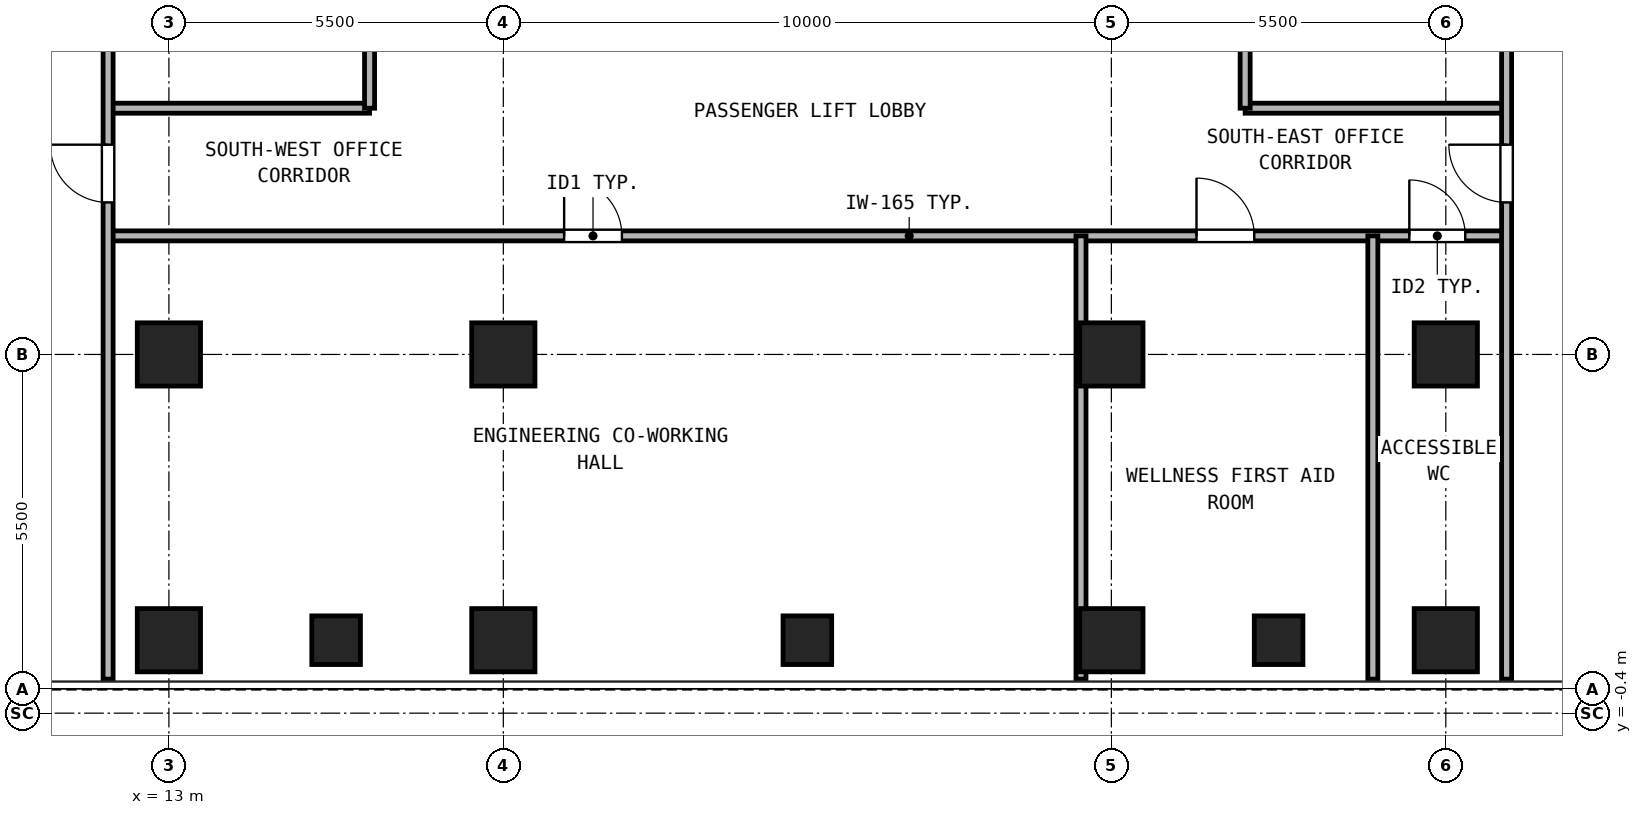
"""IFC4 building model, lengths in metres.
Left out: names, types, materials, properties, quantities, classifications, styles, units other than length and angle.
Written with IfcOpenShell. Run it as: python <this file> out.ifc"""

import sys

from ifc_helpers import new_model, si_unit, direction, frame, frame_2d, origin, origin_2d, place, context, subcontext, project, spatial, rectangle, hollow_rectangle, extrude, source, transform, mapped, element, fill, save


model = new_model("IFC4")
c1 = context("Model", 3, precision=1e-05, world=origin(), true_north=direction((0.0, 1.0)))
c2 = subcontext(c1, "Body", "Model", "MODEL_VIEW")
j1 = project(units=[si_unit("LENGTHUNIT", "METRE"), si_unit("PLANEANGLEUNIT", "RADIAN")], contexts=[c1])
p1 = place(None, origin())
s1 = spatial("IfcSite", under=j1, at=p1, CompositionType="ELEMENT")
p2 = place(p1, origin())
s2 = spatial("IfcBuilding", under=s1, at=p2, CompositionType="ELEMENT")
p3 = place(p2, frame((0.0, 0.0, 62.1)))
s3 = spatial("IfcBuildingStorey", under=s2, at=p3, CompositionType="ELEMENT", Elevation=62.1)
m1 = source(origin(), c2, "Body", "SweptSolid", [
    extrude(hollow_rectangle(XDim=1.04, YDim=1.04, WallThickness=0.065, at=origin_2d()), origin(), (0.0, 0.0, 1.0), 3.32),
])
for number, where, z_axis, x_axis in (
    (1, (13.0, 0.8, 0.0), (0.0, 0.0, 1.0), (1.0, 0.0, 0.0)),
    (2, (18.5, 0.8, 0.0), (0.0, 0.0, 1.0), (1.0, 0.0, 0.0)),
    (3, (28.5, 0.8, 0.0), (0.0, 0.0, 1.0), (1.0, 0.0, 0.0)),
    (4, (34.0, 0.8, 0.0), (0.0, 0.0, 1.0), (1.0, 0.0, 0.0)),
    (5, (13.0, 5.5, 0.0), (0.0, 0.0, 1.0), (1.0, 0.0, 0.0)),
    (6, (18.5, 5.5, 0.0), (0.0, 0.0, 1.0), (1.0, 0.0, 0.0)),
    (7, (28.5, 5.5, 0.0), (0.0, 0.0, 1.0), (1.0, 0.0, 0.0)),
    (8, (34.0, 5.5, 0.0), (0.0, 0.0, 1.0), (1.0, 0.0, 0.0)),
):
    element("IfcColumn", number, at=place(p3, frame(where, z_axis=z_axis, x_axis=x_axis)), inside=s3, PredefinedType="COLUMN", context=c2, shape_type="MappedRepresentation", body=[
        mapped(m1, transform((0.0, 0.0, 0.0), x_axis=(1.0, 0.0, 0.0), y_axis=(0.0, 1.0, 0.0), z_axis=(0.0, 0.0, 1.0), scale=1.0)),
    ])
m2 = source(origin(), c2, "Body", "SweptSolid", [
    extrude(hollow_rectangle(XDim=0.8, YDim=0.8, WallThickness=0.045, at=origin_2d()), origin(), (0.0, 0.0, 1.0), 3.32),
])
for number, where, z_axis, x_axis in (
    (9, (15.75, 0.8, 0.0), (0.0, 0.0, 1.0), (1.0, 0.0, 0.0)),
    (10, (23.5, 0.8, 0.0), (0.0, 0.0, 1.0), (1.0, 0.0, 0.0)),
    (11, (31.25, 0.8, 0.0), (0.0, 0.0, 1.0), (1.0, 0.0, 0.0)),
):
    element("IfcColumn", number, at=place(p3, frame(where, z_axis=z_axis, x_axis=x_axis)), inside=s3, PredefinedType="COLUMN", context=c2, shape_type="MappedRepresentation", body=[
        mapped(m2, transform((0.0, 0.0, 0.0), x_axis=(1.0, 0.0, 0.0), y_axis=(0.0, 1.0, 0.0), z_axis=(0.0, 0.0, 1.0), scale=1.0)),
    ])
p4 = place(p3, frame((12.0, 7.45, 0.0), z_axis=(0.0, 0.0, 1.0), x_axis=(1.0, 0.0, 0.0)))
e12 = element("IfcWall", 12, at=p4, inside=s3, PredefinedType="PARTITIONING", context=c2, shape_type="SweptSolid", body=[
    extrude(rectangle(XDim=23.0, YDim=0.165, at=frame_2d((11.5, 0.0))), origin(), (0.0, 0.0, 1.0), 3.32),
])
p5 = place(p4, frame((7.5, 0.0, 0.0)))
e13 = element("IfcOpeningElement", 13, at=p5, cuts=e12, PredefinedType="OPENING", context=c2, shape_type="SweptSolid", body=[
    extrude(rectangle(XDim=0.95, YDim=2.15, at=frame_2d((0.475, 1.075))), frame((0.0, 0.093, 0.0), z_axis=(0.0, -1.0, 0.0), x_axis=(1.0, 0.0, 0.0)), (0.0, 0.0, 1.0), 0.185),
])
p6 = place(p4, frame((17.9, 0.0, 0.0)))
e14 = element("IfcOpeningElement", 14, at=p6, cuts=e12, PredefinedType="OPENING", context=c2, shape_type="SweptSolid", body=[
    extrude(rectangle(XDim=0.95, YDim=2.15, at=frame_2d((0.475, 1.075))), frame((0.0, 0.093, 0.0), z_axis=(0.0, -1.0, 0.0), x_axis=(1.0, 0.0, 0.0)), (0.0, 0.0, 1.0), 0.185),
])
p7 = place(p4, frame((21.4, 0.0, 0.0)))
e15 = element("IfcOpeningElement", 15, at=p7, cuts=e12, PredefinedType="OPENING", context=c2, shape_type="SweptSolid", body=[
    extrude(rectangle(XDim=0.92, YDim=2.1, at=frame_2d((0.46, 1.05))), frame((0.0, 0.093, 0.0), z_axis=(0.0, -1.0, 0.0), x_axis=(1.0, 0.0, 0.0)), (0.0, 0.0, 1.0), 0.185),
])
for number, where, z_axis, x_axis in (
    (16, (12.0, 9.55, 0.0), (0.0, 0.0, 1.0), (1.0, 0.0, 0.0)),
    (17, (30.7, 9.55, 0.0), (0.0, 0.0, 1.0), (1.0, 0.0, 0.0)),
):
    element("IfcWall", number, at=place(p3, frame(where, z_axis=z_axis, x_axis=x_axis)), inside=s3, PredefinedType="PARTITIONING", context=c2, shape_type="SweptSolid", body=[
        extrude(rectangle(XDim=4.3, YDim=0.165, at=frame_2d((2.15, 0.0))), origin(), (0.0, 0.0, 1.0), 3.32),
    ])
p8 = place(p3, frame((16.3, 9.55, 0.0), z_axis=(0.0, 0.0, 1.0), x_axis=(0.0, 1.0, 0.0)))
e18 = element("IfcWall", 18, at=p8, inside=s3, PredefinedType="PARTITIONING", context=c2, shape_type="SweptSolid", body=[
    extrude(rectangle(XDim=20.9, YDim=0.165, at=frame_2d((10.45, 0.0))), origin(), (0.0, 0.0, 1.0), 3.32),
])
p9 = place(p8, frame((6.231, 0.0, 0.0)))
e19 = element("IfcOpeningElement", 19, at=p9, cuts=e18, PredefinedType="OPENING", context=c2, shape_type="SweptSolid", body=[
    extrude(rectangle(XDim=0.95, YDim=2.15, at=frame_2d((0.475, 1.075))), frame((0.0, 0.093, 0.0), z_axis=(0.0, -1.0, 0.0), x_axis=(1.0, 0.0, 0.0)), (0.0, 0.0, 1.0), 0.185),
])
p10 = place(p8, frame((16.681, 0.0, 0.0)))
e20 = element("IfcOpeningElement", 20, at=p10, cuts=e18, PredefinedType="OPENING", context=c2, shape_type="SweptSolid", body=[
    extrude(rectangle(XDim=0.95, YDim=2.15, at=frame_2d((0.475, 1.075))), frame((0.0, 0.093, 0.0), z_axis=(0.0, -1.0, 0.0), x_axis=(1.0, 0.0, 0.0)), (0.0, 0.0, 1.0), 0.185),
])
p11 = place(p3, frame((30.7, 9.55, 0.0), z_axis=(0.0, 0.0, 1.0), x_axis=(0.0, 1.0, 0.0)))
e21 = element("IfcWall", 21, at=p11, inside=s3, PredefinedType="PARTITIONING", context=c2, shape_type="SweptSolid", body=[
    extrude(rectangle(XDim=20.9, YDim=0.165, at=frame_2d((10.45, 0.0))), origin(), (0.0, 0.0, 1.0), 3.32),
])
p12 = place(p11, frame((9.95, 0.0, 0.0)))
e22 = element("IfcOpeningElement", 22, at=p12, cuts=e21, PredefinedType="OPENING", context=c2, shape_type="SweptSolid", body=[
    extrude(rectangle(XDim=0.95, YDim=2.15, at=frame_2d((0.475, 1.075))), frame((0.0, 0.093, 0.0), z_axis=(0.0, -1.0, 0.0), x_axis=(1.0, 0.0, 0.0)), (0.0, 0.0, 1.0), 0.185),
])
p13 = place(p3, frame((12.0, 0.16, 0.0), z_axis=(0.0, 0.0, 1.0), x_axis=(0.0, 1.0, 0.0)))
e23 = element("IfcWall", 23, at=p13, inside=s3, PredefinedType="PARTITIONING", context=c2, shape_type="SweptSolid", body=[
    extrude(rectangle(XDim=40.18, YDim=0.165, at=frame_2d((20.09, 0.0))), origin(), (0.0, 0.0, 1.0), 3.32),
])
p14 = place(p13, frame((7.84, 0.0, 0.0)))
e24 = element("IfcOpeningElement", 24, at=p14, cuts=e23, PredefinedType="OPENING", context=c2, shape_type="SweptSolid", body=[
    extrude(rectangle(XDim=0.95, YDim=2.15, at=frame_2d((0.475, 1.075))), frame((0.0, 0.093, 0.0), z_axis=(0.0, -1.0, 0.0), x_axis=(1.0, 0.0, 0.0)), (0.0, 0.0, 1.0), 0.185),
])
p15 = place(p13, frame((30.84, 0.0, 0.0)))
e25 = element("IfcOpeningElement", 25, at=p15, cuts=e23, PredefinedType="OPENING", context=c2, shape_type="SweptSolid", body=[
    extrude(rectangle(XDim=0.95, YDim=2.15, at=frame_2d((0.475, 1.075))), frame((0.0, 0.093, 0.0), z_axis=(0.0, -1.0, 0.0), x_axis=(1.0, 0.0, 0.0)), (0.0, 0.0, 1.0), 0.185),
])
p16 = place(p3, frame((35.0, 0.16, 0.0), z_axis=(0.0, 0.0, 1.0), x_axis=(0.0, 1.0, 0.0)))
e26 = element("IfcWall", 26, at=p16, inside=s3, PredefinedType="PARTITIONING", context=c2, shape_type="SweptSolid", body=[
    extrude(rectangle(XDim=40.18, YDim=0.165, at=frame_2d((20.09, 0.0))), origin(), (0.0, 0.0, 1.0), 3.32),
])
p17 = place(p16, frame((7.84, 0.0, 0.0)))
e27 = element("IfcOpeningElement", 27, at=p17, cuts=e26, PredefinedType="OPENING", context=c2, shape_type="SweptSolid", body=[
    extrude(rectangle(XDim=0.95, YDim=2.15, at=frame_2d((0.475, 1.075))), frame((0.0, 0.093, 0.0), z_axis=(0.0, -1.0, 0.0), x_axis=(1.0, 0.0, 0.0)), (0.0, 0.0, 1.0), 0.185),
])
p18 = place(p16, frame((30.84, 0.0, 0.0)))
e28 = element("IfcOpeningElement", 28, at=p18, cuts=e26, PredefinedType="OPENING", context=c2, shape_type="SweptSolid", body=[
    extrude(rectangle(XDim=0.95, YDim=2.15, at=frame_2d((0.475, 1.075))), frame((0.0, 0.093, 0.0), z_axis=(0.0, -1.0, 0.0), x_axis=(1.0, 0.0, 0.0)), (0.0, 0.0, 1.0), 0.185),
])
for number, where, z_axis, x_axis in (
    (29, (28.0, 0.16, 0.0), (0.0, 0.0, 1.0), (0.0, 1.0, 0.0)),
    (30, (32.8, 0.16, 0.0), (0.0, 0.0, 1.0), (0.0, 1.0, 0.0)),
):
    element("IfcWall", number, at=place(p3, frame(where, z_axis=z_axis, x_axis=x_axis)), inside=s3, PredefinedType="PARTITIONING", context=c2, shape_type="SweptSolid", body=[
        extrude(rectangle(XDim=7.29, YDim=0.165, at=frame_2d((3.645, 0.0))), origin(), (0.0, 0.0, 1.0), 3.32),
    ])
p19 = place(p5, frame((0.95, 0.0, 0.0), z_axis=(0.0, 0.0, 1.0), x_axis=(-1.0, 0.0, 0.0)))
e31 = element("IfcDoor", 31, at=p19, inside=s3, OperationType="SINGLE_SWING_LEFT", PredefinedType="DOOR", context=c2, shape_type="SweptSolid", body=[
    extrude(rectangle(XDim=0.95, YDim=2.15, at=frame_2d((0.475, 1.075))), frame((0.0, 0.025, 0.0), z_axis=(0.0, -1.0, 0.0), x_axis=(1.0, 0.0, 0.0)), (0.0, 0.0, 1.0), 0.05),
])
fill(e13, e31)
p20 = place(p6, frame((0.95, 0.0, 0.0), z_axis=(0.0, 0.0, 1.0), x_axis=(-1.0, 0.0, 0.0)))
e32 = element("IfcDoor", 32, at=p20, inside=s3, OperationType="SINGLE_SWING_LEFT", PredefinedType="DOOR", context=c2, shape_type="SweptSolid", body=[
    extrude(rectangle(XDim=0.95, YDim=2.15, at=frame_2d((0.475, 1.075))), frame((0.0, 0.025, 0.0), z_axis=(0.0, -1.0, 0.0), x_axis=(1.0, 0.0, 0.0)), (0.0, 0.0, 1.0), 0.05),
])
fill(e14, e32)
p21 = place(p7, frame((0.92, 0.0, 0.0), z_axis=(0.0, 0.0, 1.0), x_axis=(-1.0, 0.0, 0.0)))
e33 = element("IfcDoor", 33, at=p21, inside=s3, OperationType="SINGLE_SWING_LEFT", PredefinedType="DOOR", context=c2, shape_type="SweptSolid", body=[
    extrude(rectangle(XDim=0.92, YDim=2.1, at=frame_2d((0.46, 1.05))), frame((0.0, 0.025, 0.0), z_axis=(0.0, -1.0, 0.0), x_axis=(1.0, 0.0, 0.0)), (0.0, 0.0, 1.0), 0.05),
])
fill(e15, e33)
p22 = place(p14, frame((0.95, 0.0, 0.0), z_axis=(0.0, 0.0, 1.0), x_axis=(-1.0, 0.0, 0.0)))
e34 = element("IfcDoor", 34, at=p22, inside=s3, OperationType="SINGLE_SWING_RIGHT", PredefinedType="DOOR", context=c2, shape_type="SweptSolid", body=[
    extrude(rectangle(XDim=0.95, YDim=2.15, at=frame_2d((0.475, 1.075))), frame((0.0, 0.025, 0.0), z_axis=(0.0, -1.0, 0.0), x_axis=(1.0, 0.0, 0.0)), (0.0, 0.0, 1.0), 0.05),
])
fill(e24, e34)
p23 = place(p17, origin())
e35 = element("IfcDoor", 35, at=p23, inside=s3, OperationType="SINGLE_SWING_RIGHT", PredefinedType="DOOR", context=c2, shape_type="SweptSolid", body=[
    extrude(rectangle(XDim=0.95, YDim=2.15, at=frame_2d((0.475, 1.075))), frame((0.0, 0.025, 0.0), z_axis=(0.0, -1.0, 0.0), x_axis=(1.0, 0.0, 0.0)), (0.0, 0.0, 1.0), 0.05),
])
fill(e27, e35)
save(model, sys.argv[1])
